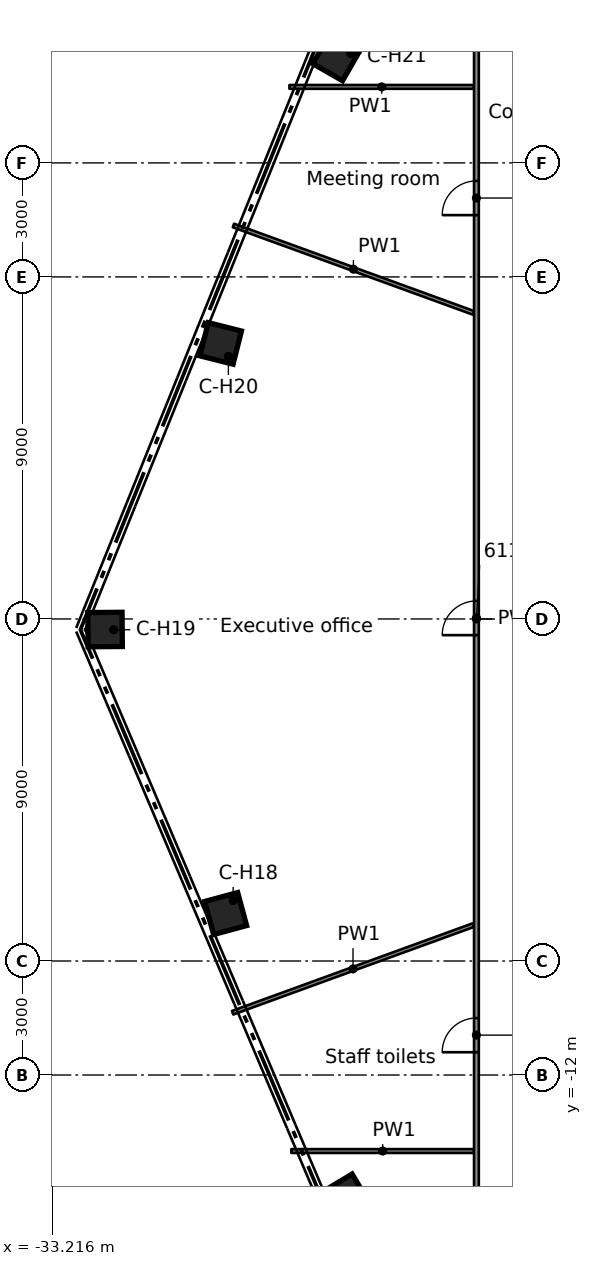
"""IFC4 building model, lengths in metres.
Left out: names, types, materials, properties, quantities, classifications, styles, units other than length and angle.
Written with IfcOpenShell. Run it as: python <this file> out.ifc"""

import sys

from ifc_helpers import new_model, si_unit, direction, frame, frame_2d, origin, origin_2d, place, context, subcontext, project, spatial, rectangle, extrude, element, fill, save


model = new_model("IFC4")
c1 = context("Model", 3, precision=1e-05, world=origin(), true_north=direction((0.0, 1.0)))
c2 = subcontext(c1, "Body", "Model", "MODEL_VIEW")
j1 = project(units=[si_unit("LENGTHUNIT", "METRE"), si_unit("PLANEANGLEUNIT", "RADIAN")], contexts=[c1])
p1 = place(None, origin())
s1 = spatial("IfcSite", under=j1, at=p1, CompositionType="ELEMENT")
p2 = place(p1, origin())
s2 = spatial("IfcBuilding", under=s1, at=p2, CompositionType="ELEMENT")
p3 = place(p2, frame((0.0, 0.0, 296.4)))
s3 = spatial("IfcBuildingStorey", under=s2, at=p3, CompositionType="ELEMENT", Elevation=296.4)
for number, where, z_axis, x_axis in (
    (1, (-25.477, -15.224, 0.0), (0.0, 0.0, 1.0), (-0.858, -0.513, 0.0)),
    (2, (-28.649, -7.751, 0.0), (0.0, 0.0, 1.0), (-0.965, -0.261, 0.0)),
    (3, (-31.821, -0.278, 0.0), (0.0, 0.0, 1.0), (-1.0, -0.009, 0.0)),
    (4, (-28.78, 7.25, 0.0), (0.0, 0.0, 1.0), (-0.97, 0.244, 0.0)),
    (5, (-25.739, 14.777, 0.0), (0.0, 0.0, 1.0), (-0.867, 0.498, 0.0)),
):
    element("IfcColumn", number, at=place(p3, frame(where, z_axis=z_axis, x_axis=x_axis)), inside=s3, PredefinedType="COLUMN", context=c2, shape_type="SweptSolid", body=[
        extrude(rectangle(XDim=0.9, YDim=0.9, at=origin_2d()), origin(), (0.0, 0.0, 1.0), 3.5),
    ])
p4 = place(p3, frame((-28.444, 10.353, 0.0), z_axis=(0.0, 0.0, 1.0), x_axis=(0.939696849906, -0.342008523689, 0.0)))
e6 = element("IfcWall", 6, at=p4, inside=s3, PredefinedType="PARTITIONING", context=c2, shape_type="SweptSolid", body=[
    extrude(rectangle(XDim=6.719, YDim=0.1, at=frame_2d((3.36, 0.0))), origin(), (0.0, 0.0, 1.0), 3.03),
])
p5 = place(p3, frame((-26.92, -14.0, 0.0), z_axis=(0.0, 0.0, 1.0), x_axis=(1.0, 0.0, 0.0)))
e7 = element("IfcWall", 7, at=p5, inside=s3, PredefinedType="PARTITIONING", context=c2, shape_type="SweptSolid", body=[
    extrude(rectangle(XDim=4.807, YDim=0.1, at=frame_2d((2.403, 0.0))), origin(), (0.0, 0.0, 1.0), 3.03),
])
p6 = place(p3, frame((-26.97, 14.0, 0.0), z_axis=(0.0, 0.0, 1.0), x_axis=(1.0, 0.0, 0.0)))
e8 = element("IfcWall", 8, at=p6, inside=s3, PredefinedType="PARTITIONING", context=c2, shape_type="SweptSolid", body=[
    extrude(rectangle(XDim=4.857, YDim=0.1, at=frame_2d((2.428, 0.0))), origin(), (0.0, 0.0, 1.0), 3.03),
])
p7 = place(p3, frame((-28.465, -10.361, 0.0), z_axis=(0.0, 0.0, 1.0), x_axis=(0.939677066281, 0.342062875953, 0.0)))
e9 = element("IfcWall", 9, at=p7, inside=s3, PredefinedType="PARTITIONING", context=c2, shape_type="SweptSolid", body=[
    extrude(rectangle(XDim=6.742, YDim=0.1, at=frame_2d((3.371, 0.0))), origin(), (0.0, 0.0, 1.0), 3.03),
])
p8 = place(p3, frame((-22.05, -15.051, 0.0), z_axis=(0.0, 0.0, 1.0), x_axis=(0.0, 1.0, 0.0)))
e10 = element("IfcWall", 10, at=p8, inside=s3, PredefinedType="PARTITIONING", context=c2, shape_type="SweptSolid", body=[
    extrude(rectangle(XDim=30.102, YDim=0.125, at=frame_2d((15.051, 0.0))), origin(), (0.0, 0.0, 1.0), 3.03),
])
p9 = place(p8, frame((14.625, 0.0, 0.0)))
e11 = element("IfcOpeningElement", 11, at=p9, cuts=e10, PredefinedType="OPENING", context=c2, shape_type="SweptSolid", body=[
    extrude(rectangle(XDim=0.9, YDim=2.1, at=frame_2d((0.45, 1.05))), frame((0.0, 0.073, 0.0), z_axis=(0.0, -1.0, 0.0), x_axis=(1.0, 0.0, 0.0)), (0.0, 0.0, 1.0), 0.145),
])
p10 = place(p8, frame((3.651, 0.0, 0.0)))
e12 = element("IfcOpeningElement", 12, at=p10, cuts=e10, PredefinedType="OPENING", context=c2, shape_type="SweptSolid", body=[
    extrude(rectangle(XDim=0.9, YDim=2.1, at=frame_2d((0.45, 1.05))), frame((0.0, 0.073, 0.0), z_axis=(0.0, -1.0, 0.0), x_axis=(1.0, 0.0, 0.0)), (0.0, 0.0, 1.0), 0.145),
])
p11 = place(p8, frame((25.677, 0.0, 0.0)))
e13 = element("IfcOpeningElement", 13, at=p11, cuts=e10, PredefinedType="OPENING", context=c2, shape_type="SweptSolid", body=[
    extrude(rectangle(XDim=0.9, YDim=2.1, at=frame_2d((0.45, 1.05))), frame((0.0, 0.073, 0.0), z_axis=(0.0, -1.0, 0.0), x_axis=(1.0, 0.0, 0.0)), (0.0, 0.0, 1.0), 0.145),
])
p12 = place(p9, origin())
e14 = element("IfcDoor", 14, at=p12, inside=s3, OperationType="SINGLE_SWING_RIGHT", PredefinedType="DOOR", context=c2, shape_type="SweptSolid", body=[
    extrude(rectangle(XDim=0.9, YDim=2.1, at=frame_2d((0.45, 1.05))), frame((0.0, 0.025, 0.0), z_axis=(0.0, -1.0, 0.0), x_axis=(1.0, 0.0, 0.0)), (0.0, 0.0, 1.0), 0.05),
])
fill(e11, e14)
p13 = place(p10, origin())
e15 = element("IfcDoor", 15, at=p13, inside=s3, OperationType="SINGLE_SWING_LEFT", PredefinedType="DOOR", context=c2, shape_type="SweptSolid", body=[
    extrude(rectangle(XDim=0.9, YDim=2.1, at=frame_2d((0.45, 1.05))), frame((0.0, 0.025, 0.0), z_axis=(0.0, -1.0, 0.0), x_axis=(1.0, 0.0, 0.0)), (0.0, 0.0, 1.0), 0.05),
])
fill(e12, e15)
p14 = place(p11, origin())
e16 = element("IfcDoor", 16, at=p14, inside=s3, OperationType="SINGLE_SWING_RIGHT", PredefinedType="DOOR", context=c2, shape_type="SweptSolid", body=[
    extrude(rectangle(XDim=0.9, YDim=2.1, at=frame_2d((0.45, 1.05))), frame((0.0, 0.025, 0.0), z_axis=(0.0, -1.0, 0.0), x_axis=(1.0, 0.0, 0.0)), (0.0, 0.0, 1.0), 0.05),
])
fill(e13, e16)
save(model, sys.argv[1])
